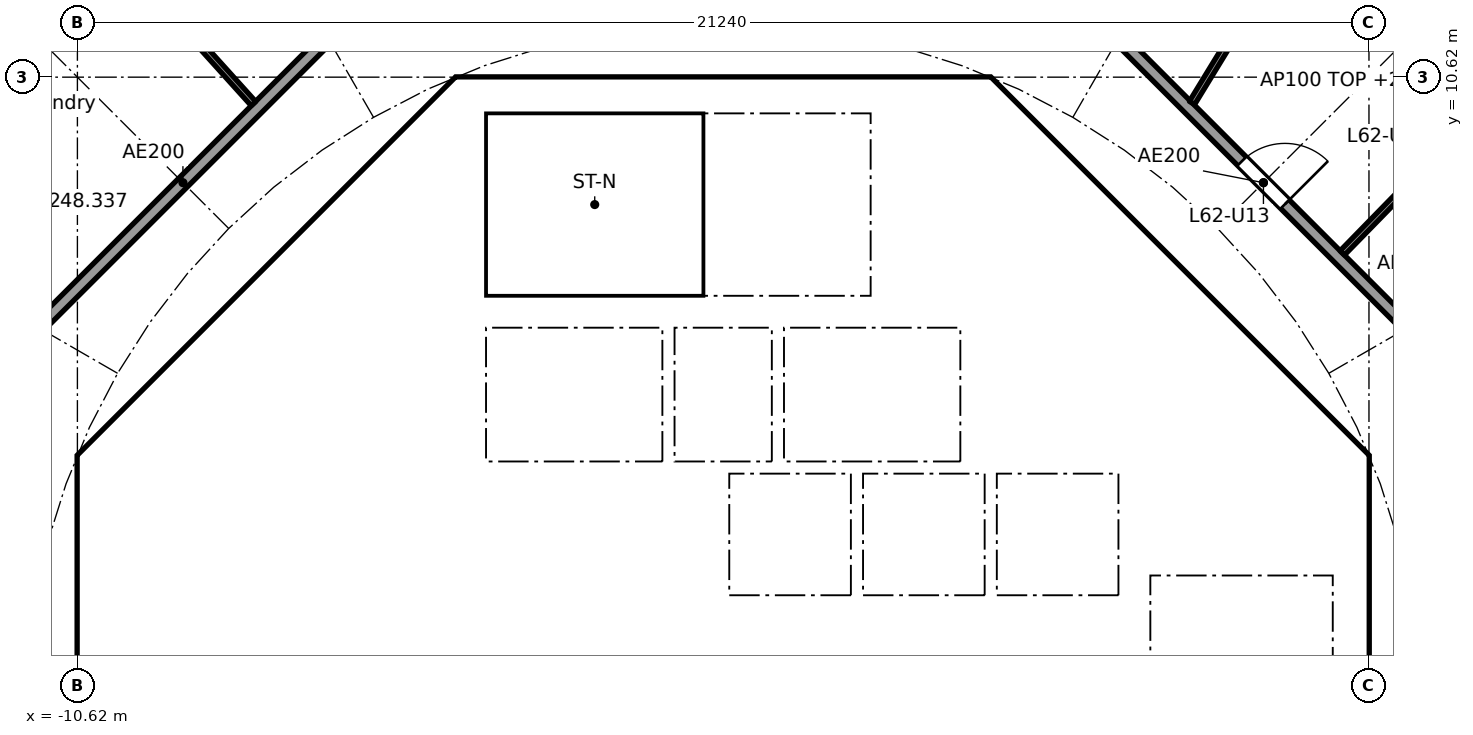
"""IFC4 building model, lengths in metres.
Left out: names, types, materials, properties, quantities, classifications, styles, units other than length and angle.
Written with IfcOpenShell. Run it as: python <this file> out.ifc"""

import sys

from ifc_helpers import new_model, si_unit, direction, frame, frame_2d, origin, place, context, subcontext, project, spatial, polyline, rectangle, outline, extrude, element, fill, save


model = new_model("IFC4")
c1 = context("Model", 3, precision=1e-05, world=origin(), true_north=direction((0.0, 1.0)))
c2 = subcontext(c1, "Body", "Model", "MODEL_VIEW")
j1 = project(units=[si_unit("LENGTHUNIT", "METRE"), si_unit("PLANEANGLEUNIT", "RADIAN")], contexts=[c1])
p1 = place(None, origin())
s1 = spatial("IfcSite", under=j1, at=p1, CompositionType="ELEMENT")
p2 = place(p1, origin())
s2 = spatial("IfcBuilding", under=s1, at=p2, CompositionType="ELEMENT")
p3 = place(p2, frame((0.0, 0.0, 245.5)))
s3 = spatial("IfcBuildingStorey", under=s2, at=p3, CompositionType="ELEMENT", Elevation=245.5)
p4 = place(p3, frame((9.988, 4.613, 0.0), z_axis=(0.0, 0.0, 1.0), x_axis=(-0.707106781187, 0.707106781187, 0.0)))
e1 = element("IfcWall", 1, at=p4, inside=s3, PredefinedType="SHEAR", context=c2, shape_type="SweptSolid", body=[
    extrude(rectangle(XDim=7.602, YDim=0.6, at=frame_2d((3.801, 0.0))), origin(), (0.0, 0.0, 1.0), 3.44),
])
p5 = place(p4, frame((3.201, 0.0, 0.0)))
e2 = element("IfcOpeningElement", 2, at=p5, cuts=e1, PredefinedType="OPENING", context=c2, shape_type="SweptSolid", body=[
    extrude(rectangle(XDim=1.2, YDim=2.1, at=frame_2d((0.6, 1.05))), frame((0.0, 0.31, 0.0), z_axis=(0.0, -1.0, 0.0), x_axis=(1.0, 0.0, 0.0)), (0.0, 0.0, 1.0), 0.62),
])
p6 = place(p3, frame((-4.613, 9.988, 0.0), z_axis=(0.0, 0.0, 1.0), x_axis=(-0.707106781187, -0.707106781187, 0.0)))
e3 = element("IfcWall", 3, at=p6, inside=s3, PredefinedType="SHEAR", context=c2, shape_type="SweptSolid", body=[
    extrude(rectangle(XDim=7.602, YDim=0.6, at=frame_2d((3.801, 0.0))), origin(), (0.0, 0.0, 1.0), 3.44),
])
p7 = place(p6, frame((0.351, 0.0, 0.0)))
e4 = element("IfcOpeningElement", 4, at=p7, cuts=e3, PredefinedType="OPENING", context=c2, shape_type="SweptSolid", body=[
    extrude(rectangle(XDim=1.1, YDim=2.1, at=frame_2d((0.55, 1.05))), frame((0.0, 0.31, 0.0), z_axis=(0.0, -1.0, 0.0), x_axis=(1.0, 0.0, 0.0)), (0.0, 0.0, 1.0), 0.62),
])
p8 = place(p3, frame((-10.325, 3.801, 0.0), z_axis=(0.0, 0.0, 1.0), x_axis=(0.0, -1.0, 0.0)))
e5 = element("IfcWall", 5, at=p8, inside=s3, PredefinedType="SHEAR", context=c2, shape_type="SweptSolid", body=[
    extrude(rectangle(XDim=7.602, YDim=0.6, at=frame_2d((3.801, 0.0))), origin(), (0.0, 0.0, 1.0), 3.44),
])
p9 = place(p8, frame((0.651, 0.0, 0.0)))
e6 = element("IfcOpeningElement", 6, at=p9, cuts=e5, PredefinedType="OPENING", context=c2, shape_type="SweptSolid", body=[
    extrude(rectangle(XDim=1.5, YDim=2.1, at=frame_2d((0.75, 1.05))), frame((0.0, 0.31, 0.0), z_axis=(0.0, -1.0, 0.0), x_axis=(1.0, 0.0, 0.0)), (0.0, 0.0, 1.0), 0.62),
])
p10 = place(p8, frame((5.451, 0.0, 0.0)))
e7 = element("IfcOpeningElement", 7, at=p10, cuts=e5, PredefinedType="OPENING", context=c2, shape_type="SweptSolid", body=[
    extrude(rectangle(XDim=1.5, YDim=2.1, at=frame_2d((0.75, 1.05))), frame((0.0, 0.31, 0.0), z_axis=(0.0, -1.0, 0.0), x_axis=(1.0, 0.0, 0.0)), (0.0, 0.0, 1.0), 0.62),
])
p11 = place(p3, frame((-5.8, 4.3, 0.0), z_axis=(0.0, 0.0, 1.0), x_axis=(0.0, 1.0, 0.0)))
e8 = element("IfcWall", 8, at=p11, inside=s3, PredefinedType="PARTITIONING", context=c2, shape_type="SweptSolid", body=[
    extrude(rectangle(XDim=3.927, YDim=0.15, at=frame_2d((1.963, 0.0))), origin(), (0.0, 0.0, 1.0), 3.44),
])
p12 = place(p11, frame((0.413, 0.0, 0.0)))
e9 = element("IfcOpeningElement", 9, at=p12, cuts=e8, PredefinedType="OPENING", context=c2, shape_type="SweptSolid", body=[
    extrude(rectangle(XDim=0.9, YDim=2.1, at=frame_2d((0.45, 1.05))), frame((0.0, 0.085, 0.0), z_axis=(0.0, -1.0, 0.0), x_axis=(1.0, 0.0, 0.0)), (0.0, 0.0, 1.0), 0.17),
])
p13 = place(p11, frame((2.489, 0.0, 0.0)))
e10 = element("IfcOpeningElement", 10, at=p13, cuts=e8, PredefinedType="OPENING", context=c2, shape_type="SweptSolid", body=[
    extrude(rectangle(XDim=0.9, YDim=2.1, at=frame_2d((0.45, 1.05))), frame((0.0, 0.085, 0.0), z_axis=(0.0, -1.0, 0.0), x_axis=(1.0, 0.0, 0.0)), (0.0, 0.0, 1.0), 0.17),
])
p14 = place(p3, frame((4.0, 4.3, 0.0), z_axis=(0.0, 0.0, 1.0), x_axis=(0.0, 1.0, 0.0)))
e11 = element("IfcWall", 11, at=p14, inside=s3, PredefinedType="SOLIDWALL", context=c2, shape_type="SweptSolid", body=[
    extrude(rectangle(XDim=2.2, YDim=0.2, at=frame_2d((1.1, 0.0))), origin(), (0.0, 0.0, 1.0), 3.44),
])
p15 = place(p14, frame((0.55, 0.0, 0.0)))
e12 = element("IfcOpeningElement", 12, at=p15, cuts=e11, PredefinedType="OPENING", context=c2, shape_type="SweptSolid", body=[
    extrude(rectangle(XDim=1.1, YDim=2.1, at=frame_2d((0.55, 1.05))), frame((0.0, 0.11, 0.0), z_axis=(0.0, -1.0, 0.0), x_axis=(1.0, 0.0, 0.0)), (0.0, 0.0, 1.0), 0.22),
])
p16 = place(p3, frame((-4.0, 4.3, 0.0), z_axis=(0.0, 0.0, 1.0), x_axis=(0.0, 1.0, 0.0)))
e13 = element("IfcWall", 13, at=p16, inside=s3, PredefinedType="SOLIDWALL", context=c2, shape_type="SweptSolid", body=[
    extrude(rectangle(XDim=2.2, YDim=0.2, at=frame_2d((1.1, 0.0))), origin(), (0.0, 0.0, 1.0), 3.44),
])
p17 = place(p16, frame((0.55, 0.0, 0.0)))
e14 = element("IfcOpeningElement", 14, at=p17, cuts=e13, PredefinedType="OPENING", context=c2, shape_type="SweptSolid", body=[
    extrude(rectangle(XDim=1.1, YDim=2.1, at=frame_2d((0.55, 1.05))), frame((0.0, 0.11, 0.0), z_axis=(0.0, -1.0, 0.0), x_axis=(1.0, 0.0, 0.0)), (0.0, 0.0, 1.0), 0.22),
])
p18 = place(p3, frame((-6.7, 2.0, 0.0), z_axis=(0.0, 0.0, 1.0), x_axis=(1.0, 0.0, 0.0)))
e15 = element("IfcWall", 15, at=p18, inside=s3, PredefinedType="SOLIDWALL", context=c2, shape_type="SweptSolid", body=[
    extrude(rectangle(XDim=13.4, YDim=0.2, at=frame_2d((6.7, 0.0))), origin(), (0.0, 0.0, 1.0), 3.44),
])
p19 = place(p18, frame((7.25, 0.0, 0.0)))
e16 = element("IfcOpeningElement", 16, at=p19, cuts=e15, PredefinedType="OPENING", context=c2, shape_type="SweptSolid", body=[
    extrude(rectangle(XDim=1.1, YDim=2.1, at=frame_2d((0.55, 1.05))), frame((0.0, 0.11, 0.0), z_axis=(0.0, -1.0, 0.0), x_axis=(1.0, 0.0, 0.0)), (0.0, 0.0, 1.0), 0.22),
])
p20 = place(p18, frame((9.45, 0.0, 0.0)))
e17 = element("IfcOpeningElement", 17, at=p20, cuts=e15, PredefinedType="OPENING", context=c2, shape_type="SweptSolid", body=[
    extrude(rectangle(XDim=1.1, YDim=2.1, at=frame_2d((0.55, 1.05))), frame((0.0, 0.11, 0.0), z_axis=(0.0, -1.0, 0.0), x_axis=(1.0, 0.0, 0.0)), (0.0, 0.0, 1.0), 0.22),
])
p21 = place(p18, frame((0.75, 0.0, 0.0)))
e18 = element("IfcOpeningElement", 18, at=p21, cuts=e15, PredefinedType="OPENING", context=c2, shape_type="SweptSolid", body=[
    extrude(rectangle(XDim=0.9, YDim=2.1, at=frame_2d((0.45, 1.05))), frame((0.0, 0.11, 0.0), z_axis=(0.0, -1.0, 0.0), x_axis=(1.0, 0.0, 0.0)), (0.0, 0.0, 1.0), 0.22),
])
p22 = place(p18, frame((4.05, 0.0, 0.0)))
e19 = element("IfcOpeningElement", 19, at=p22, cuts=e15, PredefinedType="OPENING", context=c2, shape_type="SweptSolid", body=[
    extrude(rectangle(XDim=0.9, YDim=2.1, at=frame_2d((0.45, 1.05))), frame((0.0, 0.11, 0.0), z_axis=(0.0, -1.0, 0.0), x_axis=(1.0, 0.0, 0.0)), (0.0, 0.0, 1.0), 0.22),
])
p23 = place(p3, frame((6.7, 4.0, 0.0), z_axis=(0.0, 0.0, 1.0), x_axis=(1.0, 0.0, 0.0)))
e20 = element("IfcWall", 20, at=p23, inside=s3, PredefinedType="SOLIDWALL", context=c2, shape_type="SweptSolid", body=[
    extrude(rectangle(XDim=3.325, YDim=0.2, at=frame_2d((1.662, 0.0))), origin(), (0.0, 0.0, 1.0), 3.44),
])
p24 = place(p23, frame((1.25, 0.0, 0.0)))
e21 = element("IfcOpeningElement", 21, at=p24, cuts=e20, PredefinedType="OPENING", context=c2, shape_type="SweptSolid", body=[
    extrude(rectangle(XDim=1.1, YDim=2.1, at=frame_2d((0.55, 1.05))), frame((0.0, 0.11, 0.0), z_axis=(0.0, -1.0, 0.0), x_axis=(1.0, 0.0, 0.0)), (0.0, 0.0, 1.0), 0.22),
])
p25 = place(p3, frame((4.0, 7.025, 0.0), z_axis=(0.0, 0.0, 1.0), x_axis=(0.0, 1.0, 0.0)))
e22 = element("IfcWall", 22, at=p25, inside=s3, PredefinedType="SOLIDWALL", context=c2, shape_type="SweptSolid", body=[
    extrude(rectangle(XDim=3.0, YDim=0.2, at=frame_2d((1.5, 0.0))), origin(), (0.0, 0.0, 1.0), 3.44),
])
p26 = place(p25, frame((0.925, 0.0, 0.0)))
e23 = element("IfcOpeningElement", 23, at=p26, cuts=e22, PredefinedType="OPENING", context=c2, shape_type="SweptSolid", body=[
    extrude(rectangle(XDim=1.1, YDim=2.1, at=frame_2d((0.55, 1.05))), frame((0.0, 0.11, 0.0), z_axis=(0.0, -1.0, 0.0), x_axis=(1.0, 0.0, 0.0)), (0.0, 0.0, 1.0), 0.22),
])
p27 = place(p3, origin())
e24 = element("IfcWall", 24, at=p27, inside=s3, PredefinedType="SHEAR", context=c2, shape_type="SweptSolid", body=[
    extrude(outline(polyline([(-10.2, 4.825), (-9.776, 4.401), (-10.025, 4.152), (-10.025, 3.801), (-10.625, 3.801), (-10.625, 4.401), (-10.2, 4.825)])), origin(), (0.0, 0.0, 1.0), 3.44),
])
p28 = place(p3, origin())
e25 = element("IfcWall", 25, at=p28, inside=s3, PredefinedType="SHEAR", context=c2, shape_type="SweptSolid", body=[
    extrude(outline(polyline([(-4.152, 10.025), (-4.401, 9.776), (-4.825, 10.2), (-4.401, 10.625), (4.401, 10.625), (4.825, 10.2), (4.401, 9.776), (4.152, 10.025), (-4.152, 10.025)])), origin(), (0.0, 0.0, 1.0), 3.44),
])
p29 = place(p3, origin())
e26 = element("IfcWall", 26, at=p29, inside=s3, PredefinedType="SHEAR", context=c2, shape_type="SweptSolid", body=[
    extrude(outline(polyline([(9.776, -4.401), (10.025, -4.152), (10.025, -3.801), (10.025, 4.152), (9.776, 4.401), (10.2, 4.825), (10.625, 4.401), (10.625, -4.401), (10.2, -4.825), (9.776, -4.401)])), origin(), (0.0, 0.0, 1.0), 3.44),
])
p30 = place(p3, frame((-10.025, 4.0, 0.0), z_axis=(0.0, 0.0, 1.0), x_axis=(1.0, 0.0, 0.0)))
e27 = element("IfcWall", 27, at=p30, inside=s3, PredefinedType="PARTITIONING", context=c2, shape_type="SweptSolid", body=[
    extrude(rectangle(XDim=3.325, YDim=0.2, at=frame_2d((1.662, 0.0))), origin(), (0.0, 0.0, 1.0), 3.44),
])
p31 = place(p3, frame((-8.001, 6.1, 0.0), z_axis=(0.0, 0.0, 1.0), x_axis=(1.0, 0.0, 0.0)))
e28 = element("IfcWall", 28, at=p31, inside=s3, PredefinedType="PARTITIONING", context=c2, shape_type="SweptSolid", body=[
    extrude(rectangle(XDim=2.126, YDim=0.15, at=frame_2d((1.063, 0.0))), origin(), (0.0, 0.0, 1.0), 3.44),
])
for number, where, z_axis, x_axis in (
    (29, (-0.9, 4.3, 0.0), (0.0, 0.0, 1.0), (0.0, 1.0, 0.0)),
    (30, (0.9, 4.3, 0.0), (0.0, 0.0, 1.0), (0.0, 1.0, 0.0)),
):
    element("IfcWall", number, at=place(p3, frame(where, z_axis=z_axis, x_axis=x_axis)), inside=s3, PredefinedType="SOLIDWALL", context=c2, shape_type="SweptSolid", body=[
        extrude(rectangle(XDim=2.2, YDim=0.2, at=frame_2d((1.1, 0.0))), origin(), (0.0, 0.0, 1.0), 3.44),
    ])
p32 = place(p3, origin())
e31 = element("IfcWall", 31, at=p32, inside=s3, PredefinedType="SOLIDWALL", context=c2, shape_type="SweptSolid", body=[
    extrude(outline(polyline([(-6.7, 4.3), (6.7, 4.3), (6.7, 2.1), (6.5, 2.1), (6.5, 4.1), (4.5, 4.1), (4.5, 2.1), (4.3, 2.1), (4.3, 4.1), (2.3, 4.1), (2.3, 2.1), (2.1, 2.1), (2.1, 4.1), (0.1, 4.1), (0.1, 2.1), (-0.1, 2.1), (-0.1, 4.1), (-4.3, 4.1), (-4.3, 2.1), (-4.5, 2.1), (-4.5, 4.1), (-6.5, 4.1), (-6.5, 2.1), (-6.7, 2.1), (-6.7, 4.3)])), origin(), (0.0, 0.0, 1.0), 3.44),
])
p33 = place(p3, origin())
e32 = element("IfcWall", 32, at=p33, inside=s3, PredefinedType="SOLIDWALL", context=c2, shape_type="SweptSolid", body=[
    extrude(outline(polyline([(-3.9, 7.025), (-4.1, 7.025), (-4.1, 10.025), (-3.9, 10.025), (-3.9, 7.025)])), origin(), (0.0, 0.0, 1.0), 3.44),
])
p34 = place(p3, origin())
e33 = element("IfcWall", 33, at=p34, inside=s3, PredefinedType="SOLIDWALL", context=c2, shape_type="SweptSolid", body=[
    extrude(outline(polyline([(4.1, 6.5), (-4.1, 6.5), (-4.1, 7.025), (4.1, 7.025), (4.1, 6.5)])), origin(), (0.0, 0.0, 1.0), 3.44),
])
p35 = place(p3, origin())
e34 = element("IfcWall", 34, at=p35, inside=s3, PredefinedType="SOLIDWALL", context=c2, shape_type="SweptSolid", body=[
    extrude(outline(polyline([(7.025, -3.9), (6.7, -3.9), (6.7, 3.9), (7.025, 3.9), (7.025, -3.9)])), origin(), (0.0, 0.0, 1.0), 3.44),
])
p36 = place(p3, frame((12.635, 5.134, 0.0), z_axis=(0.0, 0.0, 1.0), x_axis=(-0.707106781187, 0.707106781187, 0.0)))
e35 = element("IfcWall", 35, at=p36, inside=s3, PredefinedType="PARTITIONING", context=c2, shape_type="SweptSolid", body=[
    extrude(rectangle(XDim=10.609, YDim=0.2, at=frame_2d((5.305, 0.0))), origin(), (0.0, 0.0, 1.0), 3.44),
])
p37 = place(p36, frame((4.804, 0.0, 0.0)))
e36 = element("IfcOpeningElement", 36, at=p37, cuts=e35, PredefinedType="OPENING", context=c2, shape_type="SweptSolid", body=[
    extrude(rectangle(XDim=1.0, YDim=2.1, at=frame_2d((0.5, 1.05))), frame((0.0, 0.11, 0.0), z_axis=(0.0, -1.0, 0.0), x_axis=(1.0, 0.0, 0.0)), (0.0, 0.0, 1.0), 0.22),
])
p38 = place(p3, frame((-5.275, 12.494, 0.0), z_axis=(0.0, 0.0, 1.0), x_axis=(-0.707106781187, -0.707106781187, 0.0)))
e37 = element("IfcWall", 37, at=p38, inside=s3, PredefinedType="PARTITIONING", context=c2, shape_type="SweptSolid", body=[
    extrude(rectangle(XDim=10.209, YDim=0.2, at=frame_2d((5.104, 0.0))), origin(), (0.0, 0.0, 1.0), 3.44),
])
p39 = place(p3, frame((10.181, 7.729, 0.0), z_axis=(0.0, 0.0, 1.0), x_axis=(0.698426432281, 0.715681855779, 0.0)))
e38 = element("IfcWall", 38, at=p39, inside=s3, PredefinedType="PARTITIONING", context=c2, shape_type="SweptSolid", body=[
    extrude(rectangle(XDim=7.881, YDim=0.1, at=frame_2d((3.94, 0.0))), origin(), (0.0, 0.0, 1.0), 2.762),
])
p40 = place(p39, frame((1.419, 0.0, 0.0)))
e39 = element("IfcOpeningElement", 39, at=p40, cuts=e38, PredefinedType="OPENING", context=c2, shape_type="SweptSolid", body=[
    extrude(rectangle(XDim=0.9, YDim=2.1, at=frame_2d((0.45, 1.05))), frame((0.0, 0.06, 0.0), z_axis=(0.0, -1.0, 0.0), x_axis=(1.0, 0.0, 0.0)), (0.0, 0.0, 1.0), 0.12),
])
p41 = place(p39, frame((5.334, 0.0, 0.0)))
e40 = element("IfcOpeningElement", 40, at=p41, cuts=e38, PredefinedType="OPENING", context=c2, shape_type="SweptSolid", body=[
    extrude(rectangle(XDim=0.9, YDim=2.1, at=frame_2d((0.45, 1.05))), frame((0.0, 0.06, 0.0), z_axis=(0.0, -1.0, 0.0), x_axis=(1.0, 0.0, 0.0)), (0.0, 0.0, 1.0), 0.12),
])
p42 = place(p3, frame((7.71, 10.197, 0.0), z_axis=(0.0, 0.0, 1.0), x_axis=(0.521477621335, 0.853264959111, 0.0)))
e41 = element("IfcWall", 41, at=p42, inside=s3, PredefinedType="PARTITIONING", context=c2, shape_type="SweptSolid", body=[
    extrude(rectangle(XDim=8.941, YDim=0.1, at=frame_2d((4.471, 0.0))), origin(), (0.0, 0.0, 1.0), 2.762),
])
p43 = place(p42, frame((1.675, 0.0, 0.0)))
e42 = element("IfcOpeningElement", 42, at=p43, cuts=e41, PredefinedType="OPENING", context=c2, shape_type="SweptSolid", body=[
    extrude(rectangle(XDim=0.9, YDim=2.1, at=frame_2d((0.45, 1.05))), frame((0.0, 0.06, 0.0), z_axis=(0.0, -1.0, 0.0), x_axis=(1.0, 0.0, 0.0)), (0.0, 0.0, 1.0), 0.12),
])
p44 = place(p42, frame((6.121, 0.0, 0.0)))
e43 = element("IfcOpeningElement", 43, at=p44, cuts=e41, PredefinedType="OPENING", context=c2, shape_type="SweptSolid", body=[
    extrude(rectangle(XDim=0.9, YDim=2.1, at=frame_2d((0.45, 1.05))), frame((0.0, 0.06, 0.0), z_axis=(0.0, -1.0, 0.0), x_axis=(1.0, 0.0, 0.0)), (0.0, 0.0, 1.0), 0.12),
])
p45 = place(p3, frame((-7.725, 10.186, 0.0), z_axis=(0.0, 0.0, 1.0), x_axis=(-0.669817301526, 0.742525947409, 0.0)))
e44 = element("IfcWall", 44, at=p45, inside=s3, PredefinedType="PARTITIONING", context=c2, shape_type="SweptSolid", body=[
    extrude(rectangle(XDim=4.949, YDim=0.1, at=frame_2d((2.475, 0.0))), origin(), (0.0, 0.0, 1.0), 2.762),
])
p46 = place(p3, frame((-11.039, 13.785, 0.0), z_axis=(0.0, 0.0, 1.0), x_axis=(-0.642258090087, -0.766488451131, 0.0)))
e45 = element("IfcWall", 45, at=p46, inside=s3, PredefinedType="PARTITIONING", context=c2, shape_type="SweptSolid", body=[
    extrude(rectangle(XDim=4.361, YDim=0.1, at=frame_2d((2.18, 0.0))), origin(), (0.0, 0.0, 1.0), 2.837),
])
p47 = place(p19, origin())
e46 = element("IfcDoor", 46, at=p47, inside=s3, OperationType="DOUBLE_DOOR_SLIDING", PredefinedType="DOOR", context=c2, shape_type="SweptSolid", body=[
    extrude(rectangle(XDim=1.1, YDim=2.1, at=frame_2d((0.55, 1.05))), frame((0.0, 0.025, 0.0), z_axis=(0.0, -1.0, 0.0), x_axis=(1.0, 0.0, 0.0)), (0.0, 0.0, 1.0), 0.05),
])
fill(e16, e46)
p48 = place(p20, origin())
e47 = element("IfcDoor", 47, at=p48, inside=s3, OperationType="DOUBLE_DOOR_SLIDING", PredefinedType="DOOR", context=c2, shape_type="SweptSolid", body=[
    extrude(rectangle(XDim=1.1, YDim=2.1, at=frame_2d((0.55, 1.05))), frame((0.0, 0.025, 0.0), z_axis=(0.0, -1.0, 0.0), x_axis=(1.0, 0.0, 0.0)), (0.0, 0.0, 1.0), 0.05),
])
fill(e17, e47)
p49 = place(p15, origin())
e48 = element("IfcDoor", 48, at=p49, inside=s3, OperationType="DOUBLE_DOOR_SLIDING", PredefinedType="DOOR", context=c2, shape_type="SweptSolid", body=[
    extrude(rectangle(XDim=1.1, YDim=2.1, at=frame_2d((0.55, 1.05))), frame((0.0, 0.025, 0.0), z_axis=(0.0, -1.0, 0.0), x_axis=(1.0, 0.0, 0.0)), (0.0, 0.0, 1.0), 0.05),
])
fill(e12, e48)
p50 = place(p17, origin())
e49 = element("IfcDoor", 49, at=p50, inside=s3, OperationType="DOUBLE_DOOR_SLIDING", PredefinedType="DOOR", context=c2, shape_type="SweptSolid", body=[
    extrude(rectangle(XDim=1.1, YDim=2.1, at=frame_2d((0.55, 1.05))), frame((0.0, 0.025, 0.0), z_axis=(0.0, -1.0, 0.0), x_axis=(1.0, 0.0, 0.0)), (0.0, 0.0, 1.0), 0.05),
])
fill(e14, e49)
p51 = place(p24, frame((1.1, 0.0, 0.0), x_axis=(-1.0, 0.0, 0.0)))
e50 = element("IfcDoor", 50, at=p51, inside=s3, OperationType="SINGLE_SWING_LEFT", PredefinedType="DOOR", context=c2, shape_type="SweptSolid", body=[
    extrude(rectangle(XDim=1.1, YDim=2.1, at=frame_2d((0.55, 1.05))), frame((0.0, 0.025, 0.0), z_axis=(0.0, -1.0, 0.0), x_axis=(1.0, 0.0, 0.0)), (0.0, 0.0, 1.0), 0.05),
])
fill(e21, e50)
p52 = place(p26, origin())
e51 = element("IfcDoor", 51, at=p52, inside=s3, OperationType="SINGLE_SWING_RIGHT", PredefinedType="DOOR", context=c2, shape_type="SweptSolid", body=[
    extrude(rectangle(XDim=1.1, YDim=2.1, at=frame_2d((0.55, 1.05))), frame((0.0, 0.025, 0.0), z_axis=(0.0, -1.0, 0.0), x_axis=(1.0, 0.0, 0.0)), (0.0, 0.0, 1.0), 0.05),
])
fill(e23, e51)
p53 = place(p12, origin())
e52 = element("IfcDoor", 52, at=p53, inside=s3, OperationType="SINGLE_SWING_LEFT", PredefinedType="DOOR", context=c2, shape_type="SweptSolid", body=[
    extrude(rectangle(XDim=0.9, YDim=2.1, at=frame_2d((0.45, 1.05))), frame((0.0, 0.025, 0.0), z_axis=(0.0, -1.0, 0.0), x_axis=(1.0, 0.0, 0.0)), (0.0, 0.0, 1.0), 0.05),
])
fill(e9, e52)
p54 = place(p13, origin())
e53 = element("IfcDoor", 53, at=p54, inside=s3, OperationType="SINGLE_SWING_LEFT", PredefinedType="DOOR", context=c2, shape_type="SweptSolid", body=[
    extrude(rectangle(XDim=0.9, YDim=2.1, at=frame_2d((0.45, 1.05))), frame((0.0, 0.025, 0.0), z_axis=(0.0, -1.0, 0.0), x_axis=(1.0, 0.0, 0.0)), (0.0, 0.0, 1.0), 0.05),
])
fill(e10, e53)
p55 = place(p21, origin())
e54 = element("IfcDoor", 54, at=p55, inside=s3, OperationType="SINGLE_SWING_RIGHT", PredefinedType="DOOR", context=c2, shape_type="SweptSolid", body=[
    extrude(rectangle(XDim=0.9, YDim=2.1, at=frame_2d((0.45, 1.05))), frame((0.0, 0.025, 0.0), z_axis=(0.0, -1.0, 0.0), x_axis=(1.0, 0.0, 0.0)), (0.0, 0.0, 1.0), 0.05),
])
fill(e18, e54)
p56 = place(p22, origin())
e55 = element("IfcDoor", 55, at=p56, inside=s3, OperationType="SINGLE_SWING_RIGHT", PredefinedType="DOOR", context=c2, shape_type="SweptSolid", body=[
    extrude(rectangle(XDim=0.9, YDim=2.1, at=frame_2d((0.45, 1.05))), frame((0.0, 0.025, 0.0), z_axis=(0.0, -1.0, 0.0), x_axis=(1.0, 0.0, 0.0)), (0.0, 0.0, 1.0), 0.05),
])
fill(e19, e55)
p57 = place(p5, origin())
e56 = element("IfcDoor", 56, at=p57, inside=s3, OperationType="SINGLE_SWING_RIGHT", PredefinedType="DOOR", context=c2, shape_type="SweptSolid", body=[
    extrude(rectangle(XDim=1.2, YDim=2.1, at=frame_2d((0.6, 1.05))), frame((0.0, 0.025, 0.0), z_axis=(0.0, -1.0, 0.0), x_axis=(1.0, 0.0, 0.0)), (0.0, 0.0, 1.0), 0.05),
])
fill(e2, e56)
p58 = place(p9, origin())
e57 = element("IfcDoor", 57, at=p58, inside=s3, OperationType="DOUBLE_DOOR_SINGLE_SWING", PredefinedType="DOOR", context=c2, shape_type="SweptSolid", body=[
    extrude(rectangle(XDim=1.5, YDim=2.1, at=frame_2d((0.75, 1.05))), frame((0.0, 0.025, 0.0), z_axis=(0.0, -1.0, 0.0), x_axis=(1.0, 0.0, 0.0)), (0.0, 0.0, 1.0), 0.05),
])
fill(e6, e57)
p59 = place(p7, origin())
e58 = element("IfcDoor", 58, at=p59, inside=s3, OperationType="SINGLE_SWING_RIGHT", PredefinedType="DOOR", context=c2, shape_type="SweptSolid", body=[
    extrude(rectangle(XDim=1.1, YDim=2.1, at=frame_2d((0.55, 1.05))), frame((0.0, 0.025, 0.0), z_axis=(0.0, -1.0, 0.0), x_axis=(1.0, 0.0, 0.0)), (0.0, 0.0, 1.0), 0.05),
])
fill(e4, e58)
p60 = place(p37, frame((1.0, 0.0, 0.0), x_axis=(-1.0, 0.0, 0.0)))
e59 = element("IfcDoor", 59, at=p60, inside=s3, OperationType="SINGLE_SWING_RIGHT", PredefinedType="DOOR", context=c2, shape_type="SweptSolid", body=[
    extrude(rectangle(XDim=1.0, YDim=2.1, at=frame_2d((0.5, 1.05))), frame((0.0, 0.025, 0.0), z_axis=(0.0, -1.0, 0.0), x_axis=(1.0, 0.0, 0.0)), (0.0, 0.0, 1.0), 0.05),
])
fill(e36, e59)
save(model, sys.argv[1])
